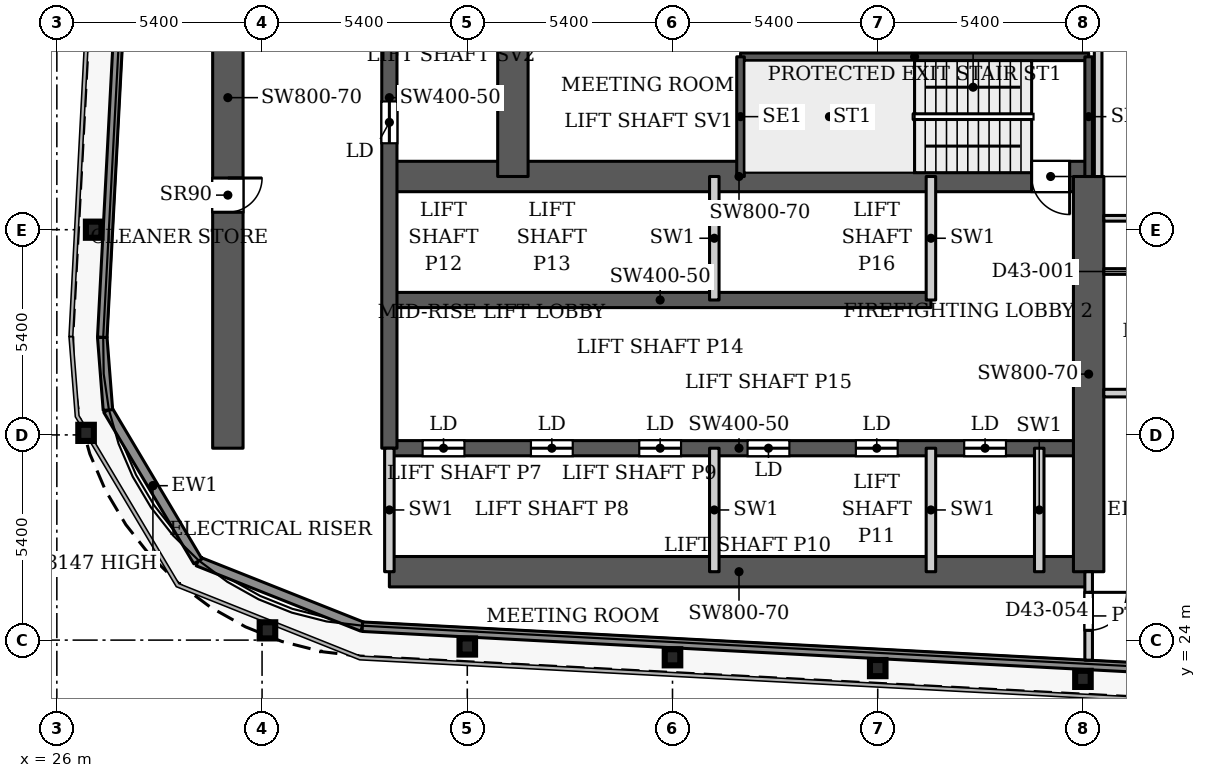
"""IFC4 building model, lengths in metres.
Left out: names, types, materials, properties, quantities, classifications, styles, units other than length and angle.
Written with IfcOpenShell. Run it as: python <this file> out.ifc"""

import sys

from ifc_helpers import new_model, si_unit, direction, frame, frame_2d, origin, origin_2d, place, context, subcontext, project, spatial, rectangle, i_section, extrude, source, transform, mapped, element, fill, save


model = new_model("IFC4")
c1 = context("Model", 3, precision=1e-05, world=origin(), true_north=direction((0.0, 1.0)))
c2 = subcontext(c1, "Body", "Model", "MODEL_VIEW")
j1 = project(units=[si_unit("LENGTHUNIT", "METRE"), si_unit("PLANEANGLEUNIT", "RADIAN")], contexts=[c1])
p1 = place(None, origin())
s1 = spatial("IfcSite", under=j1, at=p1, CompositionType="ELEMENT")
p2 = place(p1, origin())
s2 = spatial("IfcBuilding", under=s1, at=p2, CompositionType="ELEMENT")
p3 = place(p2, frame((0.0, 0.0, 183.8)))
s3 = spatial("IfcBuildingStorey", under=s2, at=p3, CompositionType="ELEMENT", Elevation=183.8)
for number, where, z_axis, x_axis in (
    (1, (53.0, 22.98, 0.0), (0.0, 0.0, 1.0), (1.0, 0.0, 0.0)),
    (2, (47.6, 23.264, 0.0), (0.0, 0.0, 1.0), (1.0, 0.0, 0.0)),
    (3, (42.2, 23.548, 0.0), (0.0, 0.0, 1.0), (1.0, 0.0, 0.0)),
    (4, (36.8, 23.832, 0.0), (0.0, 0.0, 1.0), (1.0, 0.0, 0.0)),
    (5, (31.542, 24.257, 0.0), (0.0, 0.0, 1.0), (1.0, 0.0, 0.0)),
    (6, (26.769, 29.454, 0.0), (0.0, 0.0, 1.0), (1.0, 0.0, 0.0)),
    (7, (26.969, 34.8, 0.0), (0.0, 0.0, 1.0), (1.0, 0.0, 0.0)),
):
    element("IfcColumn", number, at=place(p3, frame(where, z_axis=z_axis, x_axis=x_axis)), inside=s3, PredefinedType="COLUMN", context=c2, shape_type="SweptSolid", body=[
        extrude(i_section(OverallWidth=0.409, OverallDepth=0.425, WebThickness=0.033, FlangeThickness=0.052, FilletRadius=0.013, at=origin_2d()), origin(), (0.0, 0.0, 1.0), 3.9),
    ])
p4 = place(p3, frame((34.75, 25.8, 0.0), z_axis=(0.0, 0.0, 1.0), x_axis=(1.0, 0.0, 0.0)))
e8 = element("IfcWall", 8, at=p4, inside=s3, PredefinedType="SHEAR", context=c2, shape_type="SweptSolid", body=[
    extrude(rectangle(XDim=18.4, YDim=0.8, at=frame_2d((9.2, 0.0))), origin(), (0.0, 0.0, 1.0), 3.9),
])
p5 = place(p3, frame((34.75, 29.05, 0.0), z_axis=(0.0, 0.0, 1.0), x_axis=(1.0, 0.0, 0.0)))
e9 = element("IfcWall", 9, at=p5, inside=s3, PredefinedType="SHEAR", context=c2, shape_type="SweptSolid", body=[
    extrude(rectangle(XDim=18.4, YDim=0.4, at=frame_2d((9.2, 0.0))), origin(), (0.0, 0.0, 1.0), 3.9),
])
p6 = place(p5, frame((0.875, 0.0, 0.0)))
e10 = element("IfcOpeningElement", 10, at=p6, cuts=e9, PredefinedType="OPENING", context=c2, shape_type="SweptSolid", body=[
    extrude(rectangle(XDim=1.1, YDim=2.2, at=frame_2d((0.55, 1.1))), frame((0.0, 0.21, 0.0), z_axis=(0.0, -1.0, 0.0), x_axis=(1.0, 0.0, 0.0)), (0.0, 0.0, 1.0), 0.42),
])
p7 = place(p5, frame((3.725, 0.0, 0.0)))
e11 = element("IfcOpeningElement", 11, at=p7, cuts=e9, PredefinedType="OPENING", context=c2, shape_type="SweptSolid", body=[
    extrude(rectangle(XDim=1.1, YDim=2.2, at=frame_2d((0.55, 1.1))), frame((0.0, 0.21, 0.0), z_axis=(0.0, -1.0, 0.0), x_axis=(1.0, 0.0, 0.0)), (0.0, 0.0, 1.0), 0.42),
])
p8 = place(p5, frame((6.575, 0.0, 0.0)))
e12 = element("IfcOpeningElement", 12, at=p8, cuts=e9, PredefinedType="OPENING", context=c2, shape_type="SweptSolid", body=[
    extrude(rectangle(XDim=1.1, YDim=2.2, at=frame_2d((0.55, 1.1))), frame((0.0, 0.21, 0.0), z_axis=(0.0, -1.0, 0.0), x_axis=(1.0, 0.0, 0.0)), (0.0, 0.0, 1.0), 0.42),
])
p9 = place(p5, frame((9.425, 0.0, 0.0)))
e13 = element("IfcOpeningElement", 13, at=p9, cuts=e9, PredefinedType="OPENING", context=c2, shape_type="SweptSolid", body=[
    extrude(rectangle(XDim=1.1, YDim=2.2, at=frame_2d((0.55, 1.1))), frame((0.0, 0.21, 0.0), z_axis=(0.0, -1.0, 0.0), x_axis=(1.0, 0.0, 0.0)), (0.0, 0.0, 1.0), 0.42),
])
p10 = place(p5, frame((12.275, 0.0, 0.0)))
e14 = element("IfcOpeningElement", 14, at=p10, cuts=e9, PredefinedType="OPENING", context=c2, shape_type="SweptSolid", body=[
    extrude(rectangle(XDim=1.1, YDim=2.2, at=frame_2d((0.55, 1.1))), frame((0.0, 0.21, 0.0), z_axis=(0.0, -1.0, 0.0), x_axis=(1.0, 0.0, 0.0)), (0.0, 0.0, 1.0), 0.42),
])
p11 = place(p5, frame((15.125, 0.0, 0.0)))
e15 = element("IfcOpeningElement", 15, at=p11, cuts=e9, PredefinedType="OPENING", context=c2, shape_type="SweptSolid", body=[
    extrude(rectangle(XDim=1.1, YDim=2.2, at=frame_2d((0.55, 1.1))), frame((0.0, 0.21, 0.0), z_axis=(0.0, -1.0, 0.0), x_axis=(1.0, 0.0, 0.0)), (0.0, 0.0, 1.0), 0.42),
])
p12 = place(p3, frame((34.75, 32.95, 0.0), z_axis=(0.0, 0.0, 1.0), x_axis=(1.0, 0.0, 0.0)))
e16 = element("IfcWall", 16, at=p12, inside=s3, PredefinedType="SHEAR", context=c2, shape_type="SweptSolid", body=[
    extrude(rectangle(XDim=14.25, YDim=0.4, at=frame_2d((7.125, 0.0))), origin(), (0.0, 0.0, 1.0), 3.9),
])
p13 = place(p3, frame((34.75, 36.2, 0.0), z_axis=(0.0, 0.0, 1.0), x_axis=(1.0, 0.0, 0.0)))
e17 = element("IfcWall", 17, at=p13, inside=s3, PredefinedType="SHEAR", context=c2, shape_type="SweptSolid", body=[
    extrude(rectangle(XDim=18.4, YDim=0.8, at=frame_2d((9.2, 0.0))), origin(), (0.0, 0.0, 1.0), 3.9),
])
p14 = place(p13, frame((16.9, 0.0, 0.0)))
e18 = element("IfcOpeningElement", 18, at=p14, cuts=e17, PredefinedType="OPENING", context=c2, shape_type="SweptSolid", body=[
    extrude(rectangle(XDim=1.0, YDim=2.2, at=frame_2d((0.5, 1.1))), frame((0.0, 0.41, 0.0), z_axis=(0.0, -1.0, 0.0), x_axis=(1.0, 0.0, 0.0)), (0.0, 0.0, 1.0), 0.82),
])
p15 = place(p3, frame((34.75, 29.05, 0.0), z_axis=(0.0, 0.0, 1.0), x_axis=(0.0, 1.0, 0.0)))
e19 = element("IfcWall", 19, at=p15, inside=s3, PredefinedType="SHEAR", context=c2, shape_type="SweptSolid", body=[
    extrude(rectangle(XDim=18.45, YDim=0.4, at=frame_2d((9.225, 0.0))), origin(), (0.0, 0.0, 1.0), 3.9),
])
p16 = place(p15, frame((8.025, 0.0, 0.0)))
e20 = element("IfcOpeningElement", 20, at=p16, cuts=e19, PredefinedType="OPENING", context=c2, shape_type="SweptSolid", body=[
    extrude(rectangle(XDim=1.1, YDim=2.2, at=frame_2d((0.55, 1.1))), frame((0.0, 0.21, 0.0), z_axis=(0.0, -1.0, 0.0), x_axis=(1.0, 0.0, 0.0)), (0.0, 0.0, 1.0), 0.42),
])
p17 = place(p15, frame((10.875, 0.0, 0.0)))
e21 = element("IfcOpeningElement", 21, at=p17, cuts=e19, PredefinedType="OPENING", context=c2, shape_type="SweptSolid", body=[
    extrude(rectangle(XDim=1.1, YDim=2.2, at=frame_2d((0.55, 1.1))), frame((0.0, 0.21, 0.0), z_axis=(0.0, -1.0, 0.0), x_axis=(1.0, 0.0, 0.0)), (0.0, 0.0, 1.0), 0.42),
])
p18 = place(p15, frame((13.725, 0.0, 0.0)))
e22 = element("IfcOpeningElement", 22, at=p18, cuts=e19, PredefinedType="OPENING", context=c2, shape_type="SweptSolid", body=[
    extrude(rectangle(XDim=1.1, YDim=2.2, at=frame_2d((0.55, 1.1))), frame((0.0, 0.21, 0.0), z_axis=(0.0, -1.0, 0.0), x_axis=(1.0, 0.0, 0.0)), (0.0, 0.0, 1.0), 0.42),
])
p19 = place(p15, frame((15.95, 0.0, 0.0)))
e23 = element("IfcOpeningElement", 23, at=p19, cuts=e19, PredefinedType="OPENING", context=c2, shape_type="SweptSolid", body=[
    extrude(rectangle(XDim=1.1, YDim=2.2, at=frame_2d((0.55, 1.1))), frame((0.0, 0.21, 0.0), z_axis=(0.0, -1.0, 0.0), x_axis=(1.0, 0.0, 0.0)), (0.0, 0.0, 1.0), 0.42),
])
p20 = place(p3, frame((38.0, 36.2, 0.0), z_axis=(0.0, 0.0, 1.0), x_axis=(0.0, 1.0, 0.0)))
e24 = element("IfcWall", 24, at=p20, inside=s3, PredefinedType="SHEAR", context=c2, shape_type="SweptSolid", body=[
    extrude(rectangle(XDim=8.55, YDim=0.8, at=frame_2d((4.275, 0.0))), origin(), (0.0, 0.0, 1.0), 3.9),
])
p21 = place(p3, frame((30.5, 29.05, 0.0), z_axis=(0.0, 0.0, 1.0), x_axis=(0.0, 1.0, 0.0)))
e25 = element("IfcWall", 25, at=p21, inside=s3, PredefinedType="SHEAR", context=c2, shape_type="SweptSolid", body=[
    extrude(rectangle(XDim=18.45, YDim=0.8, at=frame_2d((9.225, 0.0))), origin(), (0.0, 0.0, 1.0), 3.9),
])
p22 = place(p21, frame((6.21, 0.0, 0.0)))
e26 = element("IfcOpeningElement", 26, at=p22, cuts=e25, PredefinedType="OPENING", context=c2, shape_type="SweptSolid", body=[
    extrude(rectangle(XDim=0.9, YDim=2.2, at=frame_2d((0.45, 1.1))), frame((0.0, 0.41, 0.0), z_axis=(0.0, -1.0, 0.0), x_axis=(1.0, 0.0, 0.0)), (0.0, 0.0, 1.0), 0.82),
])
p23 = place(p21, frame((10.684, 0.0, 0.0)))
e27 = element("IfcOpeningElement", 27, at=p23, cuts=e25, PredefinedType="OPENING", context=c2, shape_type="SweptSolid", body=[
    extrude(rectangle(XDim=0.9, YDim=2.2, at=frame_2d((0.45, 1.1))), frame((0.0, 0.41, 0.0), z_axis=(0.0, -1.0, 0.0), x_axis=(1.0, 0.0, 0.0)), (0.0, 0.0, 1.0), 0.82),
])
p24 = place(p3, frame((53.15, 25.8, 0.0), z_axis=(0.0, 0.0, 1.0), x_axis=(0.0, 1.0, 0.0)))
e28 = element("IfcWall", 28, at=p24, inside=s3, PredefinedType="SHEAR", context=c2, shape_type="SweptSolid", body=[
    extrude(rectangle(XDim=10.4, YDim=0.8, at=frame_2d((5.2, 0.0))), origin(), (0.0, 0.0, 1.0), 3.9),
])
p25 = place(p3, frame((34.039, 24.353, 0.0), z_axis=(0.0, 0.0, 1.0), x_axis=(-0.929352825399, 0.369192803184, 0.0)))
e29 = element("IfcWall", 29, at=p25, inside=s3, PredefinedType="SOLIDWALL", context=c2, shape_type="SweptSolid", body=[
    extrude(rectangle(XDim=4.656, YDim=0.25, at=frame_2d((2.328, 0.0))), origin(), (0.0, 0.0, 1.0), 3.75),
])
p26 = place(p3, frame((29.712, 26.072, 0.0), z_axis=(0.0, 0.0, 1.0), x_axis=(-0.511028049012, 0.859564036662, 0.0)))
e30 = element("IfcWall", 30, at=p26, inside=s3, PredefinedType="SOLIDWALL", context=c2, shape_type="SweptSolid", body=[
    extrude(rectangle(XDim=4.634, YDim=0.25, at=frame_2d((2.317, 0.0))), origin(), (0.0, 0.0, 1.0), 3.147),
])
p27 = place(p3, frame((27.344, 30.055, 0.0), z_axis=(0.0, 0.0, 1.0), x_axis=(-0.077571675317, 0.99698677784, 0.0)))
e31 = element("IfcWall", 31, at=p27, inside=s3, PredefinedType="SOLIDWALL", context=c2, shape_type="SweptSolid", body=[
    extrude(rectangle(XDim=1.92, YDim=0.25, at=frame_2d((0.96, 0.0))), origin(), (0.0, 0.0, 1.0), 3.75),
])
p28 = place(p3, frame((27.195, 31.969, 0.0), z_axis=(0.0, 0.0, 1.0), x_axis=(0.052554995867, 0.998618031286, 0.0)))
e32 = element("IfcWall", 32, at=p28, inside=s3, PredefinedType="SOLIDWALL", context=c2, shape_type="SweptSolid", body=[
    extrude(rectangle(XDim=66.787, YDim=0.25, at=frame_2d((33.394, 0.0))), origin(), (0.0, 0.0, 1.0), 3.75),
])
p29 = place(p3, frame((100.586, 20.85, 0.0), z_axis=(0.0, 0.0, 1.0), x_axis=(-0.99861746497, 0.052565755559, 0.0)))
e33 = element("IfcWall", 33, at=p29, inside=s3, PredefinedType="SOLIDWALL", context=c2, shape_type="SweptSolid", body=[
    extrude(rectangle(XDim=66.639, YDim=0.25, at=frame_2d((33.319, 0.0))), origin(), (0.0, 0.0, 1.0), 3.75),
])
p30 = place(p3, frame((43.99, 39.35, 0.0), z_axis=(0.0, 0.0, 1.0), x_axis=(1.0, 0.0, 0.0)))
e34 = element("IfcWall", 34, at=p30, inside=s3, PredefinedType="SHEAR", context=c2, shape_type="SweptSolid", body=[
    extrude(rectangle(XDim=9.16, YDim=0.2, at=frame_2d((4.58, 0.0))), origin(), (0.0, 0.0, 1.0), 3.9),
])
for number, where, z_axis, x_axis in (
    (35, (43.99, 36.2, 0.0), (0.0, 0.0, 1.0), (0.0, 1.0, 0.0)),
    (36, (53.15, 36.2, 0.0), (0.0, 0.0, 1.0), (0.0, 1.0, 0.0)),
):
    element("IfcWall", number, at=place(p3, frame(where, z_axis=z_axis, x_axis=x_axis)), inside=s3, PredefinedType="SHEAR", context=c2, shape_type="SweptSolid", body=[
        extrude(rectangle(XDim=3.15, YDim=0.2, at=frame_2d((1.575, 0.0))), origin(), (0.0, 0.0, 1.0), 3.9),
    ])
for number, where, z_axis, x_axis in (
    (37, (34.75, 25.8, 0.0), (0.0, 0.0, 1.0), (0.0, 1.0, 0.0)),
    (38, (43.3, 25.8, 0.0), (0.0, 0.0, 1.0), (0.0, 1.0, 0.0)),
    (39, (43.3, 32.95, 0.0), (0.0, 0.0, 1.0), (0.0, 1.0, 0.0)),
    (40, (49.0, 25.8, 0.0), (0.0, 0.0, 1.0), (0.0, 1.0, 0.0)),
    (41, (49.0, 32.95, 0.0), (0.0, 0.0, 1.0), (0.0, 1.0, 0.0)),
    (42, (51.85, 25.8, 0.0), (0.0, 0.0, 1.0), (0.0, 1.0, 0.0)),
):
    element("IfcWall", number, at=place(p3, frame(where, z_axis=z_axis, x_axis=x_axis)), inside=s3, PredefinedType="PARTITIONING", context=c2, shape_type="SweptSolid", body=[
        extrude(rectangle(XDim=3.25, YDim=0.25, at=frame_2d((1.625, 0.0))), origin(), (0.0, 0.0, 1.0), 3.9),
    ])
p31 = place(p3, frame((53.15, 23.472, 0.0), z_axis=(0.0, 0.0, 1.0), x_axis=(0.0, 1.0, 0.0)))
e43 = element("IfcWall", 43, at=p31, inside=s3, PredefinedType="PARTITIONING", context=c2, shape_type="SweptSolid", body=[
    extrude(rectangle(XDim=2.328, YDim=0.2, at=frame_2d((1.164, 0.0))), origin(), (0.0, 0.0, 1.0), 3.6),
])
p32 = place(p31, frame((0.785, 0.0, 0.0)))
e44 = element("IfcOpeningElement", 44, at=p32, cuts=e43, PredefinedType="OPENING", context=c2, shape_type="SweptSolid", body=[
    extrude(rectangle(XDim=1.0, YDim=2.1, at=frame_2d((0.5, 1.05))), frame((0.0, 0.11, 0.0), z_axis=(0.0, -1.0, 0.0), x_axis=(1.0, 0.0, 0.0)), (0.0, 0.0, 1.0), 0.22),
])
p33 = place(p3, frame((53.4, 36.199, 0.0), z_axis=(0.0, 0.0, 1.0), x_axis=(0.0, 1.0, 0.0)))
e45 = element("IfcWall", 45, at=p33, inside=s3, PredefinedType="PARTITIONING", context=c2, shape_type="SweptSolid", body=[
    extrude(rectangle(XDim=7.701, YDim=0.2, at=frame_2d((3.851, 0.0))), origin(), (0.0, 0.0, 1.0), 3.6),
])
p34 = place(p3, frame((53.549, 30.5, 0.0), z_axis=(0.0, 0.0, 1.0), x_axis=(1.0, 0.0, 0.0)))
e46 = element("IfcWall", 46, at=p34, inside=s3, PredefinedType="PARTITIONING", context=c2, shape_type="SweptSolid", body=[
    extrude(rectangle(XDim=44.551, YDim=0.2, at=frame_2d((22.275, 0.0))), origin(), (0.0, 0.0, 1.0), 3.6),
])
p35 = place(p34, frame((8.351, 0.0, 0.0)))
e47 = element("IfcOpeningElement", 47, at=p35, cuts=e46, PredefinedType="OPENING", context=c2, shape_type="SweptSolid", body=[
    extrude(rectangle(XDim=1.0, YDim=2.1, at=frame_2d((0.5, 1.05))), frame((0.0, 0.11, 0.0), z_axis=(0.0, -1.0, 0.0), x_axis=(1.0, 0.0, 0.0)), (0.0, 0.0, 1.0), 0.22),
])
p36 = place(p34, frame((12.551, 0.0, 0.0)))
e48 = element("IfcOpeningElement", 48, at=p36, cuts=e46, PredefinedType="OPENING", context=c2, shape_type="SweptSolid", body=[
    extrude(rectangle(XDim=1.0, YDim=2.1, at=frame_2d((0.5, 1.05))), frame((0.0, 0.11, 0.0), z_axis=(0.0, -1.0, 0.0), x_axis=(1.0, 0.0, 0.0)), (0.0, 0.0, 1.0), 0.22),
])
p37 = place(p34, frame((28.751, 0.0, 0.0)))
e49 = element("IfcOpeningElement", 49, at=p37, cuts=e46, PredefinedType="OPENING", context=c2, shape_type="SweptSolid", body=[
    extrude(rectangle(XDim=1.0, YDim=2.1, at=frame_2d((0.5, 1.05))), frame((0.0, 0.11, 0.0), z_axis=(0.0, -1.0, 0.0), x_axis=(1.0, 0.0, 0.0)), (0.0, 0.0, 1.0), 0.22),
])
p38 = place(p34, frame((40.751, 0.0, 0.0)))
e50 = element("IfcOpeningElement", 50, at=p38, cuts=e46, PredefinedType="OPENING", context=c2, shape_type="SweptSolid", body=[
    extrude(rectangle(XDim=1.0, YDim=2.1, at=frame_2d((0.5, 1.05))), frame((0.0, 0.11, 0.0), z_axis=(0.0, -1.0, 0.0), x_axis=(1.0, 0.0, 0.0)), (0.0, 0.0, 1.0), 0.22),
])
p39 = place(p3, frame((53.549, 33.7, 0.0), z_axis=(0.0, 0.0, 1.0), x_axis=(1.0, 0.0, 0.0)))
e51 = element("IfcWall", 51, at=p39, inside=s3, PredefinedType="PARTITIONING", context=c2, shape_type="SweptSolid", body=[
    extrude(rectangle(XDim=7.701, YDim=0.15, at=frame_2d((3.851, 0.0))), origin(), (0.0, 0.0, 1.0), 3.6),
])
p40 = place(p39, frame((0.651, 0.0, 0.0)))
e52 = element("IfcOpeningElement", 52, at=p40, cuts=e51, PredefinedType="OPENING", context=c2, shape_type="SweptSolid", body=[
    extrude(rectangle(XDim=0.8, YDim=2.1, at=frame_2d((0.4, 1.05))), frame((0.0, 0.085, 0.0), z_axis=(0.0, -1.0, 0.0), x_axis=(1.0, 0.0, 0.0)), (0.0, 0.0, 1.0), 0.17),
])
p41 = place(p39, frame((5.401, 0.0, 0.0)))
e53 = element("IfcOpeningElement", 53, at=p41, cuts=e51, PredefinedType="OPENING", context=c2, shape_type="SweptSolid", body=[
    extrude(rectangle(XDim=0.9, YDim=2.1, at=frame_2d((0.45, 1.05))), frame((0.0, 0.085, 0.0), z_axis=(0.0, -1.0, 0.0), x_axis=(1.0, 0.0, 0.0)), (0.0, 0.0, 1.0), 0.17),
])
p42 = place(p39, frame((2.751, 0.0, 0.0)))
e54 = element("IfcOpeningElement", 54, at=p42, cuts=e51, PredefinedType="OPENING", context=c2, shape_type="SweptSolid", body=[
    extrude(rectangle(XDim=0.8, YDim=2.1, at=frame_2d((0.4, 1.05))), frame((0.0, 0.085, 0.0), z_axis=(0.0, -1.0, 0.0), x_axis=(1.0, 0.0, 0.0)), (0.0, 0.0, 1.0), 0.17),
])
p43 = place(p3, frame((53.549, 35.1, 0.0), z_axis=(0.0, 0.0, 1.0), x_axis=(1.0, 0.0, 0.0)))
e55 = element("IfcWall", 55, at=p43, inside=s3, PredefinedType="PARTITIONING", context=c2, shape_type="SweptSolid", body=[
    extrude(rectangle(XDim=11.751, YDim=0.15, at=frame_2d((5.875, 0.0))), origin(), (0.0, 0.0, 1.0), 3.6),
])
p44 = place(p43, frame((5.551, 0.0, 0.0)))
e56 = element("IfcOpeningElement", 56, at=p44, cuts=e55, PredefinedType="OPENING", context=c2, shape_type="SweptSolid", body=[
    extrude(rectangle(XDim=0.9, YDim=2.1, at=frame_2d((0.45, 1.05))), frame((0.0, 0.085, 0.0), z_axis=(0.0, -1.0, 0.0), x_axis=(1.0, 0.0, 0.0)), (0.0, 0.0, 1.0), 0.17),
])
p45 = place(p43, frame((1.751, 0.0, 0.0)))
e57 = element("IfcOpeningElement", 57, at=p45, cuts=e55, PredefinedType="OPENING", context=c2, shape_type="SweptSolid", body=[
    extrude(rectangle(XDim=1.0, YDim=2.1, at=frame_2d((0.5, 1.05))), frame((0.0, 0.085, 0.0), z_axis=(0.0, -1.0, 0.0), x_axis=(1.0, 0.0, 0.0)), (0.0, 0.0, 1.0), 0.17),
])
p46 = place(p43, frame((8.101, 0.0, 0.0)))
e58 = element("IfcOpeningElement", 58, at=p46, cuts=e55, PredefinedType="OPENING", context=c2, shape_type="SweptSolid", body=[
    extrude(rectangle(XDim=0.9, YDim=2.1, at=frame_2d((0.45, 1.05))), frame((0.0, 0.085, 0.0), z_axis=(0.0, -1.0, 0.0), x_axis=(1.0, 0.0, 0.0)), (0.0, 0.0, 1.0), 0.17),
])
m1 = source(origin(), c2, "Body", "SweptSolid", [
    extrude(rectangle(XDim=1.1, YDim=2.2, at=frame_2d((0.55, 1.1))), frame((0.0, 0.025, 0.0), z_axis=(0.0, -1.0, 0.0), x_axis=(1.0, 0.0, 0.0)), (0.0, 0.0, 1.0), 0.05),
])
p47 = place(p6, origin())
e59 = element("IfcDoor", 59, at=p47, inside=s3, OperationType="SLIDING_TO_LEFT", PredefinedType="DOOR", context=c2, shape_type="MappedRepresentation", body=[
    mapped(m1, transform((0.0, 0.0, 0.0), x_axis=(1.0, 0.0, 0.0), y_axis=(0.0, 1.0, 0.0), z_axis=(0.0, 0.0, 1.0), scale=1.0)),
])
fill(e10, e59)
p48 = place(p7, origin())
e60 = element("IfcDoor", 60, at=p48, inside=s3, OperationType="SLIDING_TO_LEFT", PredefinedType="DOOR", context=c2, shape_type="MappedRepresentation", body=[
    mapped(m1, transform((0.0, 0.0, 0.0), x_axis=(1.0, 0.0, 0.0), y_axis=(0.0, 1.0, 0.0), z_axis=(0.0, 0.0, 1.0), scale=1.0)),
])
fill(e11, e60)
p49 = place(p8, origin())
e61 = element("IfcDoor", 61, at=p49, inside=s3, OperationType="SLIDING_TO_LEFT", PredefinedType="DOOR", context=c2, shape_type="MappedRepresentation", body=[
    mapped(m1, transform((0.0, 0.0, 0.0), x_axis=(1.0, 0.0, 0.0), y_axis=(0.0, 1.0, 0.0), z_axis=(0.0, 0.0, 1.0), scale=1.0)),
])
fill(e12, e61)
p50 = place(p9, origin())
e62 = element("IfcDoor", 62, at=p50, inside=s3, OperationType="SLIDING_TO_LEFT", PredefinedType="DOOR", context=c2, shape_type="MappedRepresentation", body=[
    mapped(m1, transform((0.0, 0.0, 0.0), x_axis=(1.0, 0.0, 0.0), y_axis=(0.0, 1.0, 0.0), z_axis=(0.0, 0.0, 1.0), scale=1.0)),
])
fill(e13, e62)
p51 = place(p10, origin())
e63 = element("IfcDoor", 63, at=p51, inside=s3, OperationType="SLIDING_TO_LEFT", PredefinedType="DOOR", context=c2, shape_type="MappedRepresentation", body=[
    mapped(m1, transform((0.0, 0.0, 0.0), x_axis=(1.0, 0.0, 0.0), y_axis=(0.0, 1.0, 0.0), z_axis=(0.0, 0.0, 1.0), scale=1.0)),
])
fill(e14, e63)
p52 = place(p16, origin())
e64 = element("IfcDoor", 64, at=p52, inside=s3, OperationType="SLIDING_TO_LEFT", PredefinedType="DOOR", context=c2, shape_type="MappedRepresentation", body=[
    mapped(m1, transform((0.0, 0.0, 0.0), x_axis=(1.0, 0.0, 0.0), y_axis=(0.0, 1.0, 0.0), z_axis=(0.0, 0.0, 1.0), scale=1.0)),
])
fill(e20, e64)
p53 = place(p11, origin())
e65 = element("IfcDoor", 65, at=p53, inside=s3, OperationType="SLIDING_TO_LEFT", PredefinedType="DOOR", context=c2, shape_type="MappedRepresentation", body=[
    mapped(m1, transform((0.0, 0.0, 0.0), x_axis=(1.0, 0.0, 0.0), y_axis=(0.0, 1.0, 0.0), z_axis=(0.0, 0.0, 1.0), scale=1.0)),
])
fill(e15, e65)
m2 = source(origin(), c2, "Body", "SweptSolid", [
    extrude(rectangle(XDim=0.9, YDim=2.2, at=frame_2d((0.45, 1.1))), frame((0.0, 0.025, 0.0), z_axis=(0.0, -1.0, 0.0), x_axis=(1.0, 0.0, 0.0)), (0.0, 0.0, 1.0), 0.05),
])
p54 = place(p22, origin())
e66 = element("IfcDoor", 66, at=p54, inside=s3, OperationType="SINGLE_SWING_RIGHT", PredefinedType="DOOR", context=c2, shape_type="MappedRepresentation", body=[
    mapped(m2, transform((0.0, 0.0, 0.0), x_axis=(1.0, 0.0, 0.0), y_axis=(0.0, 1.0, 0.0), z_axis=(0.0, 0.0, 1.0), scale=1.0)),
])
fill(e26, e66)
m3 = source(origin(), c2, "Body", "SweptSolid", [
    extrude(rectangle(XDim=1.0, YDim=2.2, at=frame_2d((0.5, 1.1))), frame((0.0, 0.025, 0.0), z_axis=(0.0, -1.0, 0.0), x_axis=(1.0, 0.0, 0.0)), (0.0, 0.0, 1.0), 0.05),
])
p55 = place(p14, origin())
e67 = element("IfcDoor", 67, at=p55, inside=s3, OperationType="SINGLE_SWING_RIGHT", PredefinedType="DOOR", context=c2, shape_type="MappedRepresentation", body=[
    mapped(m3, transform((0.0, 0.0, 0.0), x_axis=(1.0, 0.0, 0.0), y_axis=(0.0, 1.0, 0.0), z_axis=(0.0, 0.0, 1.0), scale=1.0)),
])
fill(e18, e67)
m4 = source(origin(), c2, "Body", "SweptSolid", [
    extrude(rectangle(XDim=1.0, YDim=2.1, at=frame_2d((0.5, 1.05))), frame((0.0, 0.025, 0.0), z_axis=(0.0, -1.0, 0.0), x_axis=(1.0, 0.0, 0.0)), (0.0, 0.0, 1.0), 0.05),
])
p56 = place(p32, origin())
e68 = element("IfcDoor", 68, at=p56, inside=s3, OperationType="SINGLE_SWING_RIGHT", PredefinedType="DOOR", context=c2, shape_type="MappedRepresentation", body=[
    mapped(m4, transform((0.0, 0.0, 0.0), x_axis=(1.0, 0.0, 0.0), y_axis=(0.0, 1.0, 0.0), z_axis=(0.0, 0.0, 1.0), scale=1.0)),
])
fill(e44, e68)
save(model, sys.argv[1])
